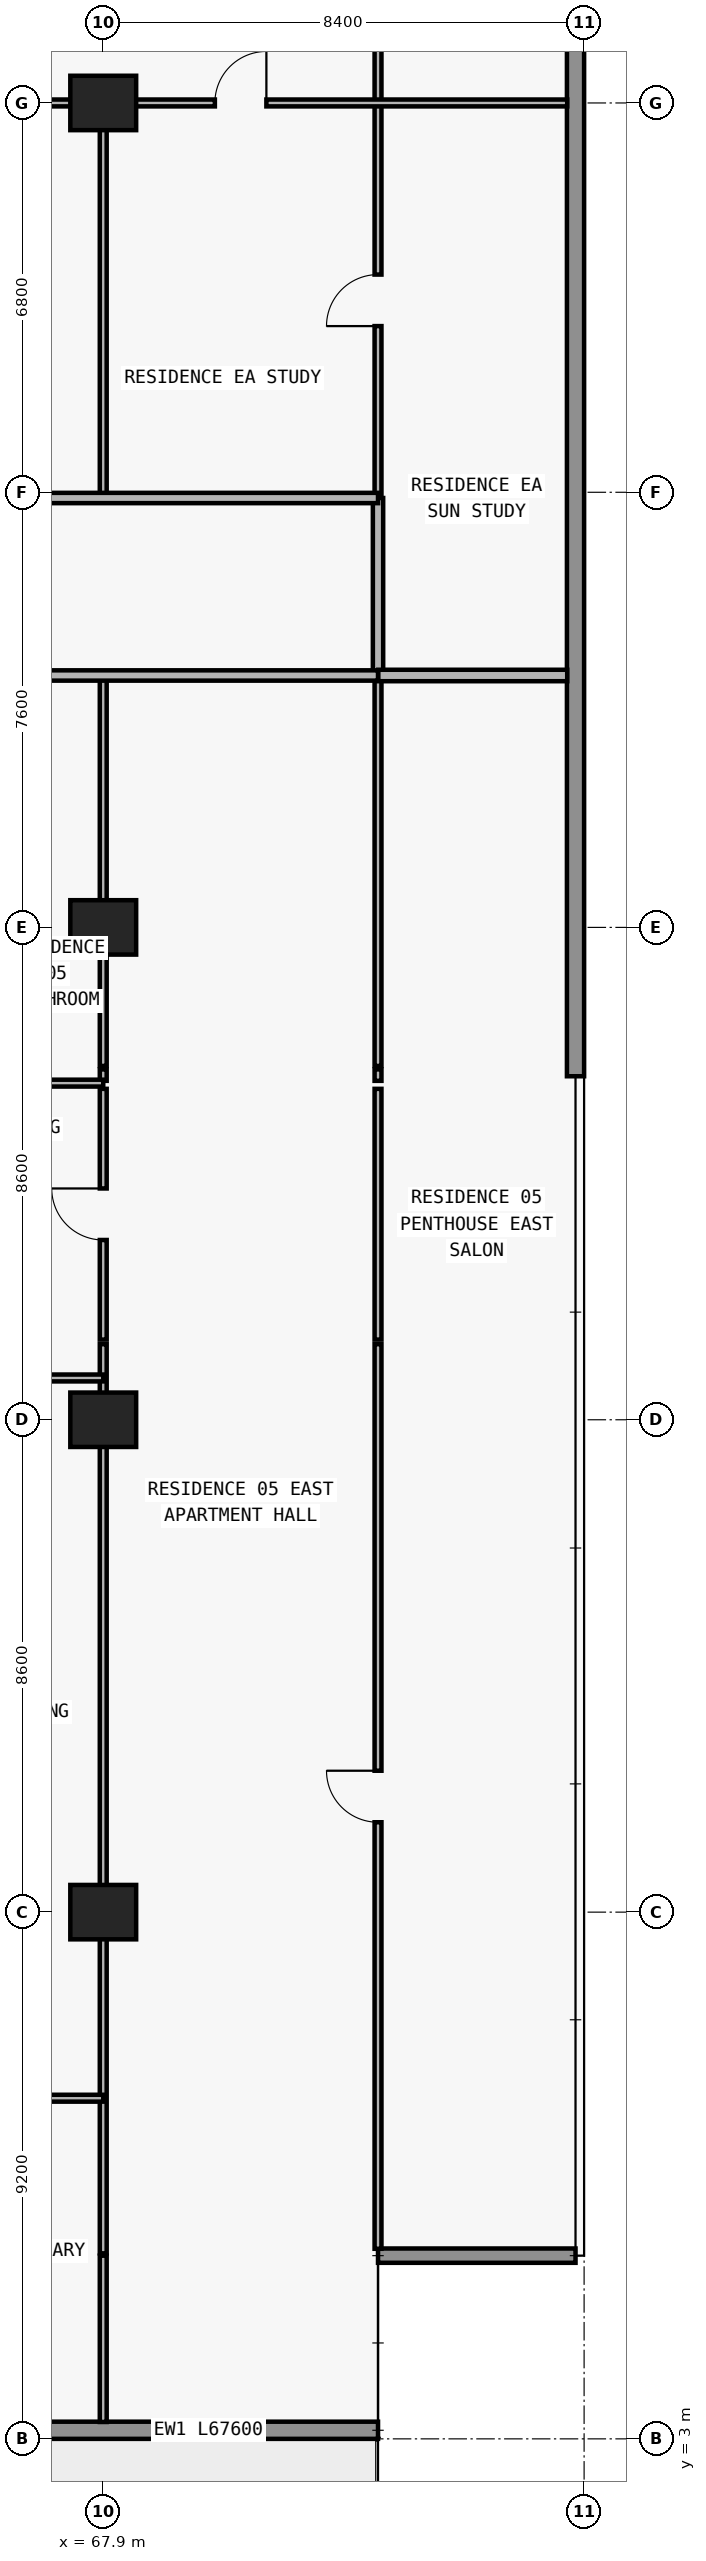
"""IFC4 building model, lengths in metres.
Left out: names, types, materials, properties, quantities, classifications, styles, units other than length and angle.
Written with IfcOpenShell. Run it as: python <this file> out.ifc"""

import sys

from ifc_helpers import new_model, si_unit, direction, frame, frame_2d, origin, origin_2d, place, context, subcontext, project, spatial, rectangle, extrude, element, fill, save


model = new_model("IFC4")
c1 = context("Model", 3, precision=1e-05, world=origin(), true_north=direction((0.0, 1.0)))
c2 = subcontext(c1, "Body", "Model", "MODEL_VIEW")
j1 = project(units=[si_unit("LENGTHUNIT", "METRE"), si_unit("PLANEANGLEUNIT", "RADIAN")], contexts=[c1])
p1 = place(None, origin())
s1 = spatial("IfcSite", under=j1, at=p1, CompositionType="ELEMENT")
p2 = place(p1, origin())
s2 = spatial("IfcBuilding", under=s1, at=p2, CompositionType="ELEMENT")
p3 = place(p2, frame((0.0, 0.0, 56.4)))
s3 = spatial("IfcBuildingStorey", under=s2, at=p3, CompositionType="ELEMENT", Elevation=56.4)
for number, where, z_axis, x_axis in (
    (1, (67.9, 12.2, 0.0), (0.0, 0.0, 1.0), (1.0, 0.0, 0.0)),
    (2, (67.9, 20.8, 0.0), (0.0, 0.0, 1.0), (1.0, 0.0, 0.0)),
    (3, (67.9, 29.4, 0.0), (0.0, 0.0, 1.0), (1.0, 0.0, 0.0)),
    (4, (67.9, 43.8, 0.0), (0.0, 0.0, 1.0), (1.0, 0.0, 0.0)),
):
    element("IfcColumn", number, at=place(p3, frame(where, z_axis=z_axis, x_axis=x_axis)), inside=s3, PredefinedType="COLUMN", context=c2, shape_type="SweptSolid", body=[
        extrude(rectangle(XDim=1.15, YDim=0.95, at=origin_2d()), origin(), (0.0, 0.0, 1.0), 3.05),
    ])
p4 = place(p3, frame((72.7, 3.15, 0.0), z_axis=(0.0, 0.0, 1.0), x_axis=(-1.0, 0.0, 0.0)))
e5 = element("IfcWall", 5, at=p4, inside=s3, PredefinedType="STANDARD", context=c2, shape_type="SweptSolid", body=[
    extrude(rectangle(XDim=67.6, YDim=0.3, at=frame_2d((33.8, 0.0))), origin(), (0.0, 0.0, 1.0), 3.05),
])
p5 = place(p4, frame((59.89, 0.0, 0.0)))
e6 = element("IfcOpeningElement", 6, at=p5, cuts=e5, PredefinedType="OPENING", context=c2, shape_type="SweptSolid", body=[
    extrude(rectangle(XDim=2.0, YDim=2.3, at=frame_2d((1.0, 1.15))), frame((0.0, 0.16, 0.0), z_axis=(0.0, -1.0, 0.0), x_axis=(1.0, 0.0, 0.0)), (0.0, 0.0, 1.0), 0.32),
])
p6 = place(p4, frame((55.21, 0.0, 0.65)))
e7 = element("IfcOpeningElement", 7, at=p6, cuts=e5, PredefinedType="OPENING", context=c2, shape_type="SweptSolid", body=[
    extrude(rectangle(XDim=2.6, YDim=1.85, at=frame_2d((1.3, 0.925))), frame((0.0, 0.16, 0.0), z_axis=(0.0, -1.0, 0.0), x_axis=(1.0, 0.0, 0.0)), (0.0, 0.0, 1.0), 0.32),
])
p7 = place(p4, frame((49.1, 0.0, 0.85)))
e8 = element("IfcOpeningElement", 8, at=p7, cuts=e5, PredefinedType="OPENING", context=c2, shape_type="SweptSolid", body=[
    extrude(rectangle(XDim=2.2, YDim=1.55, at=frame_2d((1.1, 0.775))), frame((0.0, 0.16, 0.0), z_axis=(0.0, -1.0, 0.0), x_axis=(1.0, 0.0, 0.0)), (0.0, 0.0, 1.0), 0.32),
])
p8 = place(p4, frame((43.09, 0.0, 0.0)))
e9 = element("IfcOpeningElement", 9, at=p8, cuts=e5, PredefinedType="OPENING", context=c2, shape_type="SweptSolid", body=[
    extrude(rectangle(XDim=2.0, YDim=2.3, at=frame_2d((1.0, 1.15))), frame((0.0, 0.16, 0.0), z_axis=(0.0, -1.0, 0.0), x_axis=(1.0, 0.0, 0.0)), (0.0, 0.0, 1.0), 0.32),
])
p9 = place(p4, frame((38.41, 0.0, 0.65)))
e10 = element("IfcOpeningElement", 10, at=p9, cuts=e5, PredefinedType="OPENING", context=c2, shape_type="SweptSolid", body=[
    extrude(rectangle(XDim=2.6, YDim=1.85, at=frame_2d((1.3, 0.925))), frame((0.0, 0.16, 0.0), z_axis=(0.0, -1.0, 0.0), x_axis=(1.0, 0.0, 0.0)), (0.0, 0.0, 1.0), 0.32),
])
p10 = place(p4, frame((32.7, 0.0, 0.85)))
e11 = element("IfcOpeningElement", 11, at=p10, cuts=e5, PredefinedType="OPENING", context=c2, shape_type="SweptSolid", body=[
    extrude(rectangle(XDim=2.2, YDim=1.55, at=frame_2d((1.1, 0.775))), frame((0.0, 0.16, 0.0), z_axis=(0.0, -1.0, 0.0), x_axis=(1.0, 0.0, 0.0)), (0.0, 0.0, 1.0), 0.32),
])
p11 = place(p4, frame((27.026, 0.0, 0.0)))
e12 = element("IfcOpeningElement", 12, at=p11, cuts=e5, PredefinedType="OPENING", context=c2, shape_type="SweptSolid", body=[
    extrude(rectangle(XDim=2.0, YDim=2.3, at=frame_2d((1.0, 1.15))), frame((0.0, 0.16, 0.0), z_axis=(0.0, -1.0, 0.0), x_axis=(1.0, 0.0, 0.0)), (0.0, 0.0, 1.0), 0.32),
])
p12 = place(p4, frame((22.726, 0.0, 0.85)))
e13 = element("IfcOpeningElement", 13, at=p12, cuts=e5, PredefinedType="OPENING", context=c2, shape_type="SweptSolid", body=[
    extrude(rectangle(XDim=2.2, YDim=1.55, at=frame_2d((1.1, 0.775))), frame((0.0, 0.16, 0.0), z_axis=(0.0, -1.0, 0.0), x_axis=(1.0, 0.0, 0.0)), (0.0, 0.0, 1.0), 0.32),
])
p13 = place(p4, frame((18.29, 0.0, 0.0)))
e14 = element("IfcOpeningElement", 14, at=p13, cuts=e5, PredefinedType="OPENING", context=c2, shape_type="SweptSolid", body=[
    extrude(rectangle(XDim=2.0, YDim=2.3, at=frame_2d((1.0, 1.15))), frame((0.0, 0.16, 0.0), z_axis=(0.0, -1.0, 0.0), x_axis=(1.0, 0.0, 0.0)), (0.0, 0.0, 1.0), 0.32),
])
p14 = place(p4, frame((14.19, 0.0, 0.85)))
e15 = element("IfcOpeningElement", 15, at=p14, cuts=e5, PredefinedType="OPENING", context=c2, shape_type="SweptSolid", body=[
    extrude(rectangle(XDim=1.8, YDim=1.55, at=frame_2d((0.9, 0.775))), frame((0.0, 0.16, 0.0), z_axis=(0.0, -1.0, 0.0), x_axis=(1.0, 0.0, 0.0)), (0.0, 0.0, 1.0), 0.32),
])
p15 = place(p4, frame((10.226, 0.0, 0.0)))
e16 = element("IfcOpeningElement", 16, at=p15, cuts=e5, PredefinedType="OPENING", context=c2, shape_type="SweptSolid", body=[
    extrude(rectangle(XDim=2.0, YDim=2.3, at=frame_2d((1.0, 1.15))), frame((0.0, 0.16, 0.0), z_axis=(0.0, -1.0, 0.0), x_axis=(1.0, 0.0, 0.0)), (0.0, 0.0, 1.0), 0.32),
])
p16 = place(p4, frame((5.926, 0.0, 0.85)))
e17 = element("IfcOpeningElement", 17, at=p16, cuts=e5, PredefinedType="OPENING", context=c2, shape_type="SweptSolid", body=[
    extrude(rectangle(XDim=2.2, YDim=1.55, at=frame_2d((1.1, 0.775))), frame((0.0, 0.16, 0.0), z_axis=(0.0, -1.0, 0.0), x_axis=(1.0, 0.0, 0.0)), (0.0, 0.0, 1.0), 0.32),
])
p17 = place(p3, frame((72.7, 6.2, 0.0), z_axis=(0.0, 0.0, 1.0), x_axis=(1.0, 0.0, 0.0)))
e18 = element("IfcWall", 18, at=p17, inside=s3, PredefinedType="ELEMENTEDWALL", context=c2, shape_type="SweptSolid", body=[
    extrude(rectangle(XDim=3.45, YDim=0.25, at=frame_2d((1.725, 0.0))), origin(), (0.0, 0.0, 1.0), 3.05),
])
p18 = place(p3, frame((76.15, 47.4, 0.0), z_axis=(0.0, 0.0, 1.0), x_axis=(0.0, -1.0, 0.0)))
e19 = element("IfcWall", 19, at=p18, inside=s3, PredefinedType="STANDARD", context=c2, shape_type="SweptSolid", body=[
    extrude(rectangle(XDim=20.6, YDim=0.3, at=frame_2d((10.3, 0.0))), origin(), (0.0, 0.0, 1.0), 3.05),
])
p19 = place(p3, frame((67.9, 3.295, 0.0), z_axis=(0.0, 0.0, 1.0), x_axis=(0.0, 1.0, 0.0)))
e20 = element("IfcWall", 20, at=p19, inside=s3, PredefinedType="PARTITIONING", context=c2, shape_type="SweptSolid", body=[
    extrude(rectangle(XDim=2.905, YDim=0.12, at=frame_2d((1.453, 0.0))), origin(), (0.0, 0.0, 1.0), 3.05),
])
p20 = place(p3, frame((67.9, 6.24, 0.0), z_axis=(0.0, 0.0, 1.0), x_axis=(0.0, 1.0, 0.0)))
e21 = element("IfcWall", 21, at=p20, inside=s3, PredefinedType="PARTITIONING", context=c2, shape_type="SweptSolid", body=[
    extrude(rectangle(XDim=15.88, YDim=0.12, at=frame_2d((7.94, 0.0))), origin(), (0.0, 0.0, 1.0), 2.11),
])
p21 = place(p3, frame((67.9, 22.2, 0.0), z_axis=(0.0, 0.0, 1.0), x_axis=(0.0, 1.0, 0.0)))
e22 = element("IfcWall", 22, at=p21, inside=s3, PredefinedType="PARTITIONING", context=c2, shape_type="SweptSolid", body=[
    extrude(rectangle(XDim=4.38, YDim=0.12, at=frame_2d((2.19, 0.0))), origin(), (0.0, 0.0, 1.0), 2.11),
])
p22 = place(p21, frame((1.74, 0.0, 0.0)))
e23 = element("IfcOpeningElement", 23, at=p22, cuts=e22, PredefinedType="OPENING", context=c2, shape_type="SweptSolid", body=[
    extrude(rectangle(XDim=0.9, YDim=2.06, at=frame_2d((0.45, 1.03))), frame((0.0, 0.07, 0.0), z_axis=(0.0, -1.0, 0.0), x_axis=(1.0, 0.0, 0.0)), (0.0, 0.0, 1.0), 0.14),
])
p23 = place(p3, frame((67.9, 26.72, 0.0), z_axis=(0.0, 0.0, 1.0), x_axis=(0.0, 1.0, 0.0)))
e24 = element("IfcWall", 24, at=p23, inside=s3, PredefinedType="PARTITIONING", context=c2, shape_type="SweptSolid", body=[
    extrude(rectangle(XDim=0.2, YDim=0.12, at=frame_2d((0.1, 0.0))), origin(), (0.0, 0.0, 1.0), 2.11),
])
p24 = place(p3, frame((67.9, 26.98, 0.0), z_axis=(0.0, 0.0, 1.0), x_axis=(0.0, 1.0, 0.0)))
e25 = element("IfcWall", 25, at=p24, inside=s3, PredefinedType="PARTITIONING", context=c2, shape_type="SweptSolid", body=[
    extrude(rectangle(XDim=6.82, YDim=0.12, at=frame_2d((3.41, 0.0))), origin(), (0.0, 0.0, 1.0), 2.11),
])
p25 = place(p3, frame((67.9, 36.9, 0.0), z_axis=(0.0, 0.0, 1.0), x_axis=(0.0, 1.0, 0.0)))
e26 = element("IfcWall", 26, at=p25, inside=s3, PredefinedType="PARTITIONING", context=c2, shape_type="SweptSolid", body=[
    extrude(rectangle(XDim=6.9, YDim=0.12, at=frame_2d((3.45, 0.0))), origin(), (0.0, 0.0, 1.0), 2.11),
])
p26 = place(p3, frame((72.7, 6.32, 0.0), z_axis=(0.0, 0.0, 1.0), x_axis=(0.0, 1.0, 0.0)))
e27 = element("IfcWall", 27, at=p26, inside=s3, PredefinedType="PARTITIONING", context=c2, shape_type="SweptSolid", body=[
    extrude(rectangle(XDim=15.8, YDim=0.12, at=frame_2d((7.9, 0.0))), origin(), (0.0, 0.0, 1.0), 3.05),
])
p27 = place(p26, frame((7.45, 0.0, 0.0)))
e28 = element("IfcOpeningElement", 28, at=p27, cuts=e27, PredefinedType="OPENING", context=c2, shape_type="SweptSolid", body=[
    extrude(rectangle(XDim=0.9, YDim=2.15, at=frame_2d((0.45, 1.075))), frame((0.0, 0.07, 0.0), z_axis=(0.0, -1.0, 0.0), x_axis=(1.0, 0.0, 0.0)), (0.0, 0.0, 1.0), 0.14),
])
p28 = place(p3, frame((72.7, 22.2, 0.0), z_axis=(0.0, 0.0, 1.0), x_axis=(0.0, 1.0, 0.0)))
e29 = element("IfcWall", 29, at=p28, inside=s3, PredefinedType="PARTITIONING", context=c2, shape_type="SweptSolid", body=[
    extrude(rectangle(XDim=4.38, YDim=0.12, at=frame_2d((2.19, 0.0))), origin(), (0.0, 0.0, 1.0), 3.05),
])
p29 = place(p3, frame((72.7, 26.72, 0.0), z_axis=(0.0, 0.0, 1.0), x_axis=(0.0, 1.0, 0.0)))
e30 = element("IfcWall", 30, at=p29, inside=s3, PredefinedType="PARTITIONING", context=c2, shape_type="SweptSolid", body=[
    extrude(rectangle(XDim=0.2, YDim=0.12, at=frame_2d((0.1, 0.0))), origin(), (0.0, 0.0, 1.0), 3.05),
])
p30 = place(p3, frame((72.7, 26.98, 0.0), z_axis=(0.0, 0.0, 1.0), x_axis=(0.0, 1.0, 0.0)))
e31 = element("IfcWall", 31, at=p30, inside=s3, PredefinedType="PARTITIONING", context=c2, shape_type="SweptSolid", body=[
    extrude(rectangle(XDim=6.82, YDim=0.12, at=frame_2d((3.41, 0.0))), origin(), (0.0, 0.0, 1.0), 3.05),
])
p31 = place(p3, frame((72.7, 33.805, 0.0), z_axis=(0.0, 0.0, 1.0), x_axis=(0.0, 1.0, 0.0)))
e32 = element("IfcWall", 32, at=p31, inside=s3, PredefinedType="PARTITIONING", context=c2, shape_type="SweptSolid", body=[
    extrude(rectangle(XDim=3.095, YDim=0.18, at=frame_2d((1.547, 0.0))), origin(), (0.0, 0.0, 1.0), 3.05),
])
p32 = place(p3, frame((72.7, 36.905, 0.0), z_axis=(0.0, 0.0, 1.0), x_axis=(0.0, 1.0, 0.0)))
e33 = element("IfcWall", 33, at=p32, inside=s3, PredefinedType="PARTITIONING", context=c2, shape_type="SweptSolid", body=[
    extrude(rectangle(XDim=10.375, YDim=0.12, at=frame_2d((5.188, 0.0))), origin(), (0.0, 0.0, 1.0), 3.05),
])
p33 = place(p32, frame((2.998, 0.0, 0.0)))
e34 = element("IfcOpeningElement", 34, at=p33, cuts=e33, PredefinedType="OPENING", context=c2, shape_type="SweptSolid", body=[
    extrude(rectangle(XDim=0.9, YDim=2.15, at=frame_2d((0.45, 1.075))), frame((0.0, 0.07, 0.0), z_axis=(0.0, -1.0, 0.0), x_axis=(1.0, 0.0, 0.0)), (0.0, 0.0, 1.0), 0.14),
])
p34 = place(p32, frame((8.185, 0.0, 0.0)))
e35 = element("IfcOpeningElement", 35, at=p34, cuts=e33, PredefinedType="OPENING", context=c2, shape_type="SweptSolid", body=[
    extrude(rectangle(XDim=0.9, YDim=2.15, at=frame_2d((0.45, 1.075))), frame((0.0, 0.07, 0.0), z_axis=(0.0, -1.0, 0.0), x_axis=(1.0, 0.0, 0.0)), (0.0, 0.0, 1.0), 0.14),
])
p35 = place(p3, frame((63.448, 8.95, 0.0), z_axis=(0.0, 0.0, 1.0), x_axis=(1.0, 0.0, 0.0)))
e36 = element("IfcWall", 36, at=p35, inside=s3, PredefinedType="PARTITIONING", context=c2, shape_type="SweptSolid", body=[
    extrude(rectangle(XDim=4.452, YDim=0.12, at=frame_2d((2.226, 0.0))), origin(), (0.0, 0.0, 1.0), 3.05),
])
p36 = place(p35, frame((1.776, 0.0, 0.0)))
e37 = element("IfcOpeningElement", 37, at=p36, cuts=e36, PredefinedType="OPENING", context=c2, shape_type="SweptSolid", body=[
    extrude(rectangle(XDim=0.9, YDim=2.15, at=frame_2d((0.45, 1.075))), frame((0.0, 0.07, 0.0), z_axis=(0.0, -1.0, 0.0), x_axis=(1.0, 0.0, 0.0)), (0.0, 0.0, 1.0), 0.14),
])
p37 = place(p3, frame((59.5, 21.53, 0.0), z_axis=(0.0, 0.0, 1.0), x_axis=(1.0, 0.0, 0.0)))
e38 = element("IfcWall", 38, at=p37, inside=s3, PredefinedType="PARTITIONING", context=c2, shape_type="SweptSolid", body=[
    extrude(rectangle(XDim=8.4, YDim=0.12, at=frame_2d((4.2, 0.0))), origin(), (0.0, 0.0, 1.0), 3.05),
])
p38 = place(p37, frame((1.524, 0.0, 0.0)))
e39 = element("IfcOpeningElement", 39, at=p38, cuts=e38, PredefinedType="OPENING", context=c2, shape_type="SweptSolid", body=[
    extrude(rectangle(XDim=0.9, YDim=2.15, at=frame_2d((0.45, 1.075))), frame((0.0, 0.07, 0.0), z_axis=(0.0, -1.0, 0.0), x_axis=(1.0, 0.0, 0.0)), (0.0, 0.0, 1.0), 0.14),
])
p39 = place(p37, frame((6.143, 0.0, 0.0)))
e40 = element("IfcOpeningElement", 40, at=p39, cuts=e38, PredefinedType="OPENING", context=c2, shape_type="SweptSolid", body=[
    extrude(rectangle(XDim=0.9, YDim=2.15, at=frame_2d((0.45, 1.075))), frame((0.0, 0.07, 0.0), z_axis=(0.0, -1.0, 0.0), x_axis=(1.0, 0.0, 0.0)), (0.0, 0.0, 1.0), 0.14),
])
p40 = place(p3, frame((59.5, 26.68, 0.0), z_axis=(0.0, 0.0, 1.0), x_axis=(1.0, 0.0, 0.0)))
e41 = element("IfcWall", 41, at=p40, inside=s3, PredefinedType="PARTITIONING", context=c2, shape_type="SweptSolid", body=[
    extrude(rectangle(XDim=8.4, YDim=0.12, at=frame_2d((4.2, 0.0))), origin(), (0.0, 0.0, 1.0), 3.05),
])
p41 = place(p40, frame((1.943, 0.0, 0.0)))
e42 = element("IfcOpeningElement", 42, at=p41, cuts=e41, PredefinedType="OPENING", context=c2, shape_type="SweptSolid", body=[
    extrude(rectangle(XDim=0.9, YDim=2.15, at=frame_2d((0.45, 1.075))), frame((0.0, 0.07, 0.0), z_axis=(0.0, -1.0, 0.0), x_axis=(1.0, 0.0, 0.0)), (0.0, 0.0, 1.0), 0.14),
])
p42 = place(p3, frame((5.105, 33.8, 0.0), z_axis=(0.0, 0.0, 1.0), x_axis=(1.0, 0.0, 0.0)))
e43 = element("IfcWall", 43, at=p42, inside=s3, PredefinedType="PARTITIONING", context=c2, shape_type="SweptSolid", body=[
    extrude(rectangle(XDim=67.595, YDim=0.18, at=frame_2d((33.797, 0.0))), origin(), (0.0, 0.0, 1.0), 3.05),
])
p43 = place(p42, frame((7.745, 0.0, 0.0)))
e44 = element("IfcOpeningElement", 44, at=p43, cuts=e43, PredefinedType="OPENING", context=c2, shape_type="SweptSolid", body=[
    extrude(rectangle(XDim=1.0, YDim=2.2, at=frame_2d((0.5, 1.1))), frame((0.0, 0.1, 0.0), z_axis=(0.0, -1.0, 0.0), x_axis=(1.0, 0.0, 0.0)), (0.0, 0.0, 1.0), 0.2),
])
p44 = place(p42, frame((24.545, 0.0, 0.0)))
e45 = element("IfcOpeningElement", 45, at=p44, cuts=e43, PredefinedType="OPENING", context=c2, shape_type="SweptSolid", body=[
    extrude(rectangle(XDim=1.0, YDim=2.2, at=frame_2d((0.5, 1.1))), frame((0.0, 0.1, 0.0), z_axis=(0.0, -1.0, 0.0), x_axis=(1.0, 0.0, 0.0)), (0.0, 0.0, 1.0), 0.2),
])
p45 = place(p42, frame((40.47, 0.0, 0.0)))
e46 = element("IfcOpeningElement", 46, at=p45, cuts=e43, PredefinedType="OPENING", context=c2, shape_type="SweptSolid", body=[
    extrude(rectangle(XDim=1.0, YDim=2.2, at=frame_2d((0.5, 1.1))), frame((0.0, 0.1, 0.0), z_axis=(0.0, -1.0, 0.0), x_axis=(1.0, 0.0, 0.0)), (0.0, 0.0, 1.0), 0.2),
])
p46 = place(p42, frame((48.87, 0.0, 0.0)))
e47 = element("IfcOpeningElement", 47, at=p46, cuts=e43, PredefinedType="OPENING", context=c2, shape_type="SweptSolid", body=[
    extrude(rectangle(XDim=1.0, YDim=2.2, at=frame_2d((0.5, 1.1))), frame((0.0, 0.1, 0.0), z_axis=(0.0, -1.0, 0.0), x_axis=(1.0, 0.0, 0.0)), (0.0, 0.0, 1.0), 0.2),
])
p47 = place(p42, frame((57.27, 0.0, 0.0)))
e48 = element("IfcOpeningElement", 48, at=p47, cuts=e43, PredefinedType="OPENING", context=c2, shape_type="SweptSolid", body=[
    extrude(rectangle(XDim=1.0, YDim=2.2, at=frame_2d((0.5, 1.1))), frame((0.0, 0.1, 0.0), z_axis=(0.0, -1.0, 0.0), x_axis=(1.0, 0.0, 0.0)), (0.0, 0.0, 1.0), 0.2),
])
p48 = place(p3, frame((72.705, 33.8, 0.0), z_axis=(0.0, 0.0, 1.0), x_axis=(1.0, 0.0, 0.0)))
e49 = element("IfcWall", 49, at=p48, inside=s3, PredefinedType="PARTITIONING", context=c2, shape_type="SweptSolid", body=[
    extrude(rectangle(XDim=3.3, YDim=0.2, at=frame_2d((1.65, 0.0))), origin(), (0.0, 0.0, 1.0), 3.05),
])
p49 = place(p3, frame((60.055, 36.9, 0.0), z_axis=(0.0, 0.0, 1.0), x_axis=(1.0, 0.0, 0.0)))
e50 = element("IfcWall", 50, at=p49, inside=s3, PredefinedType="PARTITIONING", context=c2, shape_type="SweptSolid", body=[
    extrude(rectangle(XDim=12.645, YDim=0.18, at=frame_2d((6.323, 0.0))), origin(), (0.0, 0.0, 1.0), 3.05),
])
p50 = place(p49, frame((4.52, 0.0, 0.0)))
e51 = element("IfcOpeningElement", 51, at=p50, cuts=e50, PredefinedType="OPENING", context=c2, shape_type="SweptSolid", body=[
    extrude(rectangle(XDim=1.0, YDim=2.2, at=frame_2d((0.5, 1.1))), frame((0.0, 0.1, 0.0), z_axis=(0.0, -1.0, 0.0), x_axis=(1.0, 0.0, 0.0)), (0.0, 0.0, 1.0), 0.2),
])
p51 = place(p3, frame((60.045, 43.8, 0.0), z_axis=(0.0, 0.0, 1.0), x_axis=(1.0, 0.0, 0.0)))
e52 = element("IfcWall", 52, at=p51, inside=s3, PredefinedType="PARTITIONING", context=c2, shape_type="SweptSolid", body=[
    extrude(rectangle(XDim=15.96, YDim=0.12, at=frame_2d((7.98, 0.0))), origin(), (0.0, 0.0, 1.0), 2.339),
])
p52 = place(p51, frame((9.805, 0.0, 0.0)))
e53 = element("IfcOpeningElement", 53, at=p52, cuts=e52, PredefinedType="OPENING", context=c2, shape_type="SweptSolid", body=[
    extrude(rectangle(XDim=0.9, YDim=2.15, at=frame_2d((0.45, 1.075))), frame((0.0, 0.07, 0.0), z_axis=(0.0, -1.0, 0.0), x_axis=(1.0, 0.0, 0.0)), (0.0, 0.0, 1.0), 0.14),
])
p53 = place(p51, frame((4.58, 0.0, 0.0)))
e54 = element("IfcOpeningElement", 54, at=p53, cuts=e52, PredefinedType="OPENING", context=c2, shape_type="SweptSolid", body=[
    extrude(rectangle(XDim=0.9, YDim=2.15, at=frame_2d((0.45, 1.075))), frame((0.0, 0.07, 0.0), z_axis=(0.0, -1.0, 0.0), x_axis=(1.0, 0.0, 0.0)), (0.0, 0.0, 1.0), 0.14),
])
p54 = place(p51, frame((0.677, 0.0, 0.0)))
e55 = element("IfcOpeningElement", 55, at=p54, cuts=e52, PredefinedType="OPENING", context=c2, shape_type="SweptSolid", body=[
    extrude(rectangle(XDim=0.85, YDim=2.1, at=frame_2d((0.425, 1.05))), frame((0.0, 0.07, 0.0), z_axis=(0.0, -1.0, 0.0), x_axis=(1.0, 0.0, 0.0)), (0.0, 0.0, 1.0), 0.14),
])
p55 = place(p22, origin())
e56 = element("IfcDoor", 56, at=p55, inside=s3, OperationType="SINGLE_SWING_RIGHT", PredefinedType="DOOR", context=c2, shape_type="SweptSolid", body=[
    extrude(rectangle(XDim=0.9, YDim=2.06, at=frame_2d((0.45, 1.03))), frame((0.0, 0.025, 0.0), z_axis=(0.0, -1.0, 0.0), x_axis=(1.0, 0.0, 0.0)), (0.0, 0.0, 1.0), 0.05),
])
fill(e23, e56)
p56 = place(p27, origin())
e57 = element("IfcDoor", 57, at=p56, inside=s3, OperationType="SINGLE_SWING_RIGHT", PredefinedType="DOOR", context=c2, shape_type="SweptSolid", body=[
    extrude(rectangle(XDim=0.9, YDim=2.15, at=frame_2d((0.45, 1.075))), frame((0.0, 0.025, 0.0), z_axis=(0.0, -1.0, 0.0), x_axis=(1.0, 0.0, 0.0)), (0.0, 0.0, 1.0), 0.05),
])
fill(e28, e57)
p57 = place(p52, origin())
e58 = element("IfcDoor", 58, at=p57, inside=s3, OperationType="SINGLE_SWING_RIGHT", PredefinedType="DOOR", context=c2, shape_type="SweptSolid", body=[
    extrude(rectangle(XDim=0.9, YDim=2.15, at=frame_2d((0.45, 1.075))), frame((0.0, 0.025, 0.0), z_axis=(0.0, -1.0, 0.0), x_axis=(1.0, 0.0, 0.0)), (0.0, 0.0, 1.0), 0.05),
])
fill(e53, e58)
p58 = place(p33, origin())
e59 = element("IfcDoor", 59, at=p58, inside=s3, OperationType="SINGLE_SWING_LEFT", PredefinedType="DOOR", context=c2, shape_type="SweptSolid", body=[
    extrude(rectangle(XDim=0.9, YDim=2.15, at=frame_2d((0.45, 1.075))), frame((0.0, 0.025, 0.0), z_axis=(0.0, -1.0, 0.0), x_axis=(1.0, 0.0, 0.0)), (0.0, 0.0, 1.0), 0.05),
])
fill(e34, e59)
save(model, sys.argv[1])
